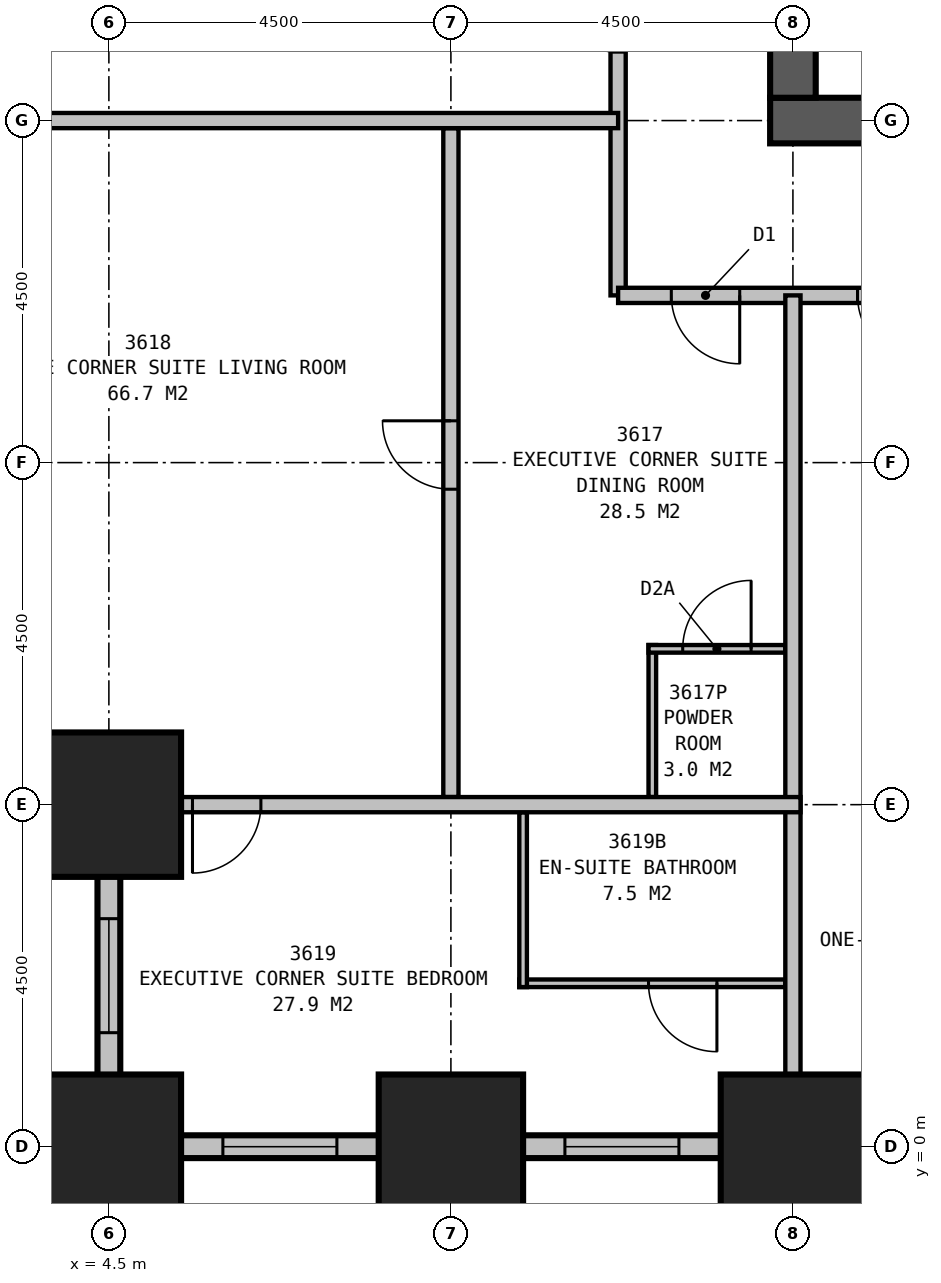
"""IFC4 building model, lengths in metres.
Left out: names, types, materials, properties, quantities, classifications, styles, units other than length and angle.
Written with IfcOpenShell. Run it as: python <this file> out.ifc"""

import sys

from ifc_helpers import new_model, si_unit, direction, frame, frame_2d, origin, origin_2d, place, context, subcontext, project, spatial, rectangle, extrude, element, fill, save


model = new_model("IFC4")
c1 = context("Model", 3, precision=1e-05, world=origin(), true_north=direction((0.0, 1.0)))
c2 = subcontext(c1, "Body", "Model", "MODEL_VIEW")
j1 = project(units=[si_unit("LENGTHUNIT", "METRE"), si_unit("PLANEANGLEUNIT", "RADIAN")], contexts=[c1])
p1 = place(None, origin())
s1 = spatial("IfcSite", under=j1, at=p1, CompositionType="ELEMENT")
p2 = place(p1, origin())
s2 = spatial("IfcBuilding", under=s1, at=p2, CompositionType="ELEMENT")
p3 = place(p2, frame((0.0, 0.0, 138.9)))
s3 = spatial("IfcBuildingStorey", under=s2, at=p3, CompositionType="ELEMENT", Elevation=138.9)
for number, where, z_axis, x_axis in (
    (1, (4.5, 4.5, 0.0), (0.0, 0.0, 1.0), (1.0, 0.0, 0.0)),
    (2, (4.5, 0.0, 0.0), (0.0, 0.0, 1.0), (1.0, 0.0, 0.0)),
    (3, (9.0, 0.0, 0.0), (0.0, 0.0, 1.0), (1.0, 0.0, 0.0)),
    (4, (13.5, 0.0, 0.0), (0.0, 0.0, 1.0), (1.0, 0.0, 0.0)),
):
    element("IfcColumn", number, at=place(p3, frame(where, z_axis=z_axis, x_axis=x_axis)), inside=s3, PredefinedType="COLUMN", context=c2, shape_type="SweptSolid", body=[
        extrude(rectangle(XDim=1.9, YDim=1.9, at=origin_2d()), origin(), (0.0, 0.0, 1.0), 3.5),
    ])
p4 = place(p3, frame((13.2, 13.5, 0.0), z_axis=(0.0, 0.0, 1.0), x_axis=(1.0, 0.0, 0.0)))
e5 = element("IfcWall", 5, at=p4, inside=s3, PredefinedType="SHEAR", context=c2, shape_type="SweptSolid", body=[
    extrude(rectangle(XDim=23.1, YDim=0.6, at=frame_2d((11.55, 0.0))), origin(), (0.0, 0.0, 1.0), 3.5),
])
p5 = place(p3, frame((13.5, 16.5, 0.0), z_axis=(0.0, 0.0, 1.0), x_axis=(0.0, -1.0, 0.0)))
e6 = element("IfcWall", 6, at=p5, inside=s3, PredefinedType="SHEAR", context=c2, shape_type="SweptSolid", body=[
    extrude(rectangle(XDim=2.7, YDim=0.6, at=frame_2d((1.35, 0.0))), origin(), (0.0, 0.0, 1.0), 3.5),
])
p6 = place(p3, frame((0.35, 4.5, 0.0), z_axis=(0.0, 0.0, 1.0), x_axis=(1.0, 0.0, 0.0)))
e7 = element("IfcWall", 7, at=p6, inside=s3, PredefinedType="STANDARD", context=c2, shape_type="SweptSolid", body=[
    extrude(rectangle(XDim=4.3, YDim=0.3, at=frame_2d((2.15, 0.0))), origin(), (0.0, 0.0, 1.0), 2.15),
])
p7 = place(p6, frame((1.4, 0.0, 0.5)))
e8 = element("IfcOpeningElement", 8, at=p7, cuts=e7, PredefinedType="OPENING", context=c2, shape_type="SweptSolid", body=[
    extrude(rectangle(XDim=1.5, YDim=1.5, at=frame_2d((0.75, 0.75))), frame((0.0, 0.16, 0.0), z_axis=(0.0, -1.0, 0.0), x_axis=(1.0, 0.0, 0.0)), (0.0, 0.0, 1.0), 0.32),
])
p8 = place(p3, frame((4.5, 4.65, 0.0), z_axis=(0.0, 0.0, 1.0), x_axis=(0.0, -1.0, 0.0)))
e9 = element("IfcWall", 9, at=p8, inside=s3, PredefinedType="STANDARD", context=c2, shape_type="SweptSolid", body=[
    extrude(rectangle(XDim=4.8, YDim=0.3, at=frame_2d((2.4, 0.0))), origin(), (0.0, 0.0, 1.0), 2.15),
])
p9 = place(p8, frame((1.65, 0.0, 0.5)))
e10 = element("IfcOpeningElement", 10, at=p9, cuts=e9, PredefinedType="OPENING", context=c2, shape_type="SweptSolid", body=[
    extrude(rectangle(XDim=1.5, YDim=1.5, at=frame_2d((0.75, 0.75))), frame((0.0, 0.16, 0.0), z_axis=(0.0, -1.0, 0.0), x_axis=(1.0, 0.0, 0.0)), (0.0, 0.0, 1.0), 0.32),
])
p10 = place(p3, frame((4.35, 0.0, 0.0), z_axis=(0.0, 0.0, 1.0), x_axis=(1.0, 0.0, 0.0)))
e11 = element("IfcWall", 11, at=p10, inside=s3, PredefinedType="STANDARD", context=c2, shape_type="SweptSolid", body=[
    extrude(rectangle(XDim=40.8, YDim=0.3, at=frame_2d((20.4, 0.0))), origin(), (0.0, 0.0, 1.0), 2.15),
])
p11 = place(p10, frame((1.65, 0.0, 0.5)))
e12 = element("IfcOpeningElement", 12, at=p11, cuts=e11, PredefinedType="OPENING", context=c2, shape_type="SweptSolid", body=[
    extrude(rectangle(XDim=1.5, YDim=1.5, at=frame_2d((0.75, 0.75))), frame((0.0, 0.16, 0.0), z_axis=(0.0, -1.0, 0.0), x_axis=(1.0, 0.0, 0.0)), (0.0, 0.0, 1.0), 0.32),
])
p12 = place(p10, frame((6.15, 0.0, 0.5)))
e13 = element("IfcOpeningElement", 13, at=p12, cuts=e11, PredefinedType="OPENING", context=c2, shape_type="SweptSolid", body=[
    extrude(rectangle(XDim=1.5, YDim=1.5, at=frame_2d((0.75, 0.75))), frame((0.0, 0.16, 0.0), z_axis=(0.0, -1.0, 0.0), x_axis=(1.0, 0.0, 0.0)), (0.0, 0.0, 1.0), 0.32),
])
p13 = place(p10, frame((10.65, 0.0, 0.5)))
e14 = element("IfcOpeningElement", 14, at=p13, cuts=e11, PredefinedType="OPENING", context=c2, shape_type="SweptSolid", body=[
    extrude(rectangle(XDim=1.5, YDim=1.5, at=frame_2d((0.75, 0.75))), frame((0.0, 0.16, 0.0), z_axis=(0.0, -1.0, 0.0), x_axis=(1.0, 0.0, 0.0)), (0.0, 0.0, 1.0), 0.32),
])
p14 = place(p10, frame((15.15, 0.0, 0.5)))
e15 = element("IfcOpeningElement", 15, at=p14, cuts=e11, PredefinedType="OPENING", context=c2, shape_type="SweptSolid", body=[
    extrude(rectangle(XDim=1.5, YDim=1.5, at=frame_2d((0.75, 0.75))), frame((0.0, 0.16, 0.0), z_axis=(0.0, -1.0, 0.0), x_axis=(1.0, 0.0, 0.0)), (0.0, 0.0, 1.0), 0.32),
])
p15 = place(p10, frame((19.65, 0.0, 0.5)))
e16 = element("IfcOpeningElement", 16, at=p15, cuts=e11, PredefinedType="OPENING", context=c2, shape_type="SweptSolid", body=[
    extrude(rectangle(XDim=1.5, YDim=1.5, at=frame_2d((0.75, 0.75))), frame((0.0, 0.16, 0.0), z_axis=(0.0, -1.0, 0.0), x_axis=(1.0, 0.0, 0.0)), (0.0, 0.0, 1.0), 0.32),
])
p16 = place(p10, frame((24.15, 0.0, 0.5)))
e17 = element("IfcOpeningElement", 17, at=p16, cuts=e11, PredefinedType="OPENING", context=c2, shape_type="SweptSolid", body=[
    extrude(rectangle(XDim=1.5, YDim=1.5, at=frame_2d((0.75, 0.75))), frame((0.0, 0.16, 0.0), z_axis=(0.0, -1.0, 0.0), x_axis=(1.0, 0.0, 0.0)), (0.0, 0.0, 1.0), 0.32),
])
p17 = place(p10, frame((28.65, 0.0, 0.5)))
e18 = element("IfcOpeningElement", 18, at=p17, cuts=e11, PredefinedType="OPENING", context=c2, shape_type="SweptSolid", body=[
    extrude(rectangle(XDim=1.5, YDim=1.5, at=frame_2d((0.75, 0.75))), frame((0.0, 0.16, 0.0), z_axis=(0.0, -1.0, 0.0), x_axis=(1.0, 0.0, 0.0)), (0.0, 0.0, 1.0), 0.32),
])
p18 = place(p10, frame((33.15, 0.0, 0.5)))
e19 = element("IfcOpeningElement", 19, at=p18, cuts=e11, PredefinedType="OPENING", context=c2, shape_type="SweptSolid", body=[
    extrude(rectangle(XDim=1.5, YDim=1.5, at=frame_2d((0.75, 0.75))), frame((0.0, 0.16, 0.0), z_axis=(0.0, -1.0, 0.0), x_axis=(1.0, 0.0, 0.0)), (0.0, 0.0, 1.0), 0.32),
])
p19 = place(p10, frame((37.65, 0.0, 0.5)))
e20 = element("IfcOpeningElement", 20, at=p19, cuts=e11, PredefinedType="OPENING", context=c2, shape_type="SweptSolid", body=[
    extrude(rectangle(XDim=1.5, YDim=1.5, at=frame_2d((0.75, 0.75))), frame((0.0, 0.16, 0.0), z_axis=(0.0, -1.0, 0.0), x_axis=(1.0, 0.0, 0.0)), (0.0, 0.0, 1.0), 0.32),
])
p20 = place(p3, frame((4.017, 36.149, 0.0), z_axis=(0.0, 0.0, 1.0), x_axis=(-0.110433201132, -0.993883548555, 0.0)))
e21 = element("IfcWall", 21, at=p20, inside=s3, PredefinedType="STANDARD", context=c2, shape_type="SweptSolid", body=[
    extrude(rectangle(XDim=31.994, YDim=0.3, at=frame_2d((15.997, 0.0))), origin(), (0.0, 0.0, 1.0), 2.15),
])
p21 = place(p20, frame((1.664, 0.0, 0.5)))
e22 = element("IfcOpeningElement", 22, at=p21, cuts=e21, PredefinedType="OPENING", context=c2, shape_type="SweptSolid", body=[
    extrude(rectangle(XDim=1.5, YDim=1.5, at=frame_2d((0.75, 0.75))), frame((0.0, 0.16, 0.0), z_axis=(0.0, -1.0, 0.0), x_axis=(1.0, 0.0, 0.0)), (0.0, 0.0, 1.0), 0.32),
])
p22 = place(p20, frame((6.192, 0.0, 0.5)))
e23 = element("IfcOpeningElement", 23, at=p22, cuts=e21, PredefinedType="OPENING", context=c2, shape_type="SweptSolid", body=[
    extrude(rectangle(XDim=1.5, YDim=1.5, at=frame_2d((0.75, 0.75))), frame((0.0, 0.16, 0.0), z_axis=(0.0, -1.0, 0.0), x_axis=(1.0, 0.0, 0.0)), (0.0, 0.0, 1.0), 0.32),
])
p23 = place(p20, frame((10.719, 0.0, 0.5)))
e24 = element("IfcOpeningElement", 24, at=p23, cuts=e21, PredefinedType="OPENING", context=c2, shape_type="SweptSolid", body=[
    extrude(rectangle(XDim=1.5, YDim=1.5, at=frame_2d((0.75, 0.75))), frame((0.0, 0.16, 0.0), z_axis=(0.0, -1.0, 0.0), x_axis=(1.0, 0.0, 0.0)), (0.0, 0.0, 1.0), 0.32),
])
p24 = place(p20, frame((15.247, 0.0, 0.5)))
e25 = element("IfcOpeningElement", 25, at=p24, cuts=e21, PredefinedType="OPENING", context=c2, shape_type="SweptSolid", body=[
    extrude(rectangle(XDim=1.5, YDim=1.5, at=frame_2d((0.75, 0.75))), frame((0.0, 0.16, 0.0), z_axis=(0.0, -1.0, 0.0), x_axis=(1.0, 0.0, 0.0)), (0.0, 0.0, 1.0), 0.32),
])
p25 = place(p20, frame((19.775, 0.0, 0.5)))
e26 = element("IfcOpeningElement", 26, at=p25, cuts=e21, PredefinedType="OPENING", context=c2, shape_type="SweptSolid", body=[
    extrude(rectangle(XDim=1.5, YDim=1.5, at=frame_2d((0.75, 0.75))), frame((0.0, 0.16, 0.0), z_axis=(0.0, -1.0, 0.0), x_axis=(1.0, 0.0, 0.0)), (0.0, 0.0, 1.0), 0.32),
])
p26 = place(p20, frame((24.302, 0.0, 0.5)))
e27 = element("IfcOpeningElement", 27, at=p26, cuts=e21, PredefinedType="OPENING", context=c2, shape_type="SweptSolid", body=[
    extrude(rectangle(XDim=1.5, YDim=1.5, at=frame_2d((0.75, 0.75))), frame((0.0, 0.16, 0.0), z_axis=(0.0, -1.0, 0.0), x_axis=(1.0, 0.0, 0.0)), (0.0, 0.0, 1.0), 0.32),
])
p27 = place(p20, frame((28.83, 0.0, 0.5)))
e28 = element("IfcOpeningElement", 28, at=p27, cuts=e21, PredefinedType="OPENING", context=c2, shape_type="SweptSolid", body=[
    extrude(rectangle(XDim=1.5, YDim=1.5, at=frame_2d((0.75, 0.75))), frame((0.0, 0.16, 0.0), z_axis=(0.0, -1.0, 0.0), x_axis=(1.0, 0.0, 0.0)), (0.0, 0.0, 1.0), 0.32),
])
p28 = place(p3, frame((11.2, 11.2, 0.0), z_axis=(0.0, 0.0, 1.0), x_axis=(1.0, 0.0, 0.0)))
e29 = element("IfcWall", 29, at=p28, inside=s3, PredefinedType="PARTITIONING", context=c2, shape_type="SweptSolid", body=[
    extrude(rectangle(XDim=27.1, YDim=0.2, at=frame_2d((13.55, 0.0))), origin(), (0.0, 0.0, 1.0), 3.25),
])
p29 = place(p28, frame((4.05, 0.0, 0.0), z_axis=(0.0, 0.0, 1.0), x_axis=(-1.0, 0.0, 0.0)))
e30 = element("IfcOpeningElement", 30, at=p29, cuts=e29, PredefinedType="OPENING", context=c2, shape_type="SweptSolid", body=[
    extrude(rectangle(XDim=0.9, YDim=2.1, at=frame_2d((0.45, 1.05))), frame((0.0, 0.11, 0.0), z_axis=(0.0, -1.0, 0.0), x_axis=(1.0, 0.0, 0.0)), (0.0, 0.0, 1.0), 0.22),
])
p30 = place(p28, frame((12.65, 0.0, 0.0), z_axis=(0.0, 0.0, 1.0), x_axis=(-1.0, 0.0, 0.0)))
e31 = element("IfcOpeningElement", 31, at=p30, cuts=e29, PredefinedType="OPENING", context=c2, shape_type="SweptSolid", body=[
    extrude(rectangle(XDim=1.0, YDim=2.1, at=frame_2d((0.5, 1.05))), frame((0.0, 0.11, 0.0), z_axis=(0.0, -1.0, 0.0), x_axis=(1.0, 0.0, 0.0)), (0.0, 0.0, 1.0), 0.22),
])
p31 = place(p28, frame((19.45, 0.0, 0.0), z_axis=(0.0, 0.0, 1.0), x_axis=(-1.0, 0.0, 0.0)))
e32 = element("IfcOpeningElement", 32, at=p31, cuts=e29, PredefinedType="OPENING", context=c2, shape_type="SweptSolid", body=[
    extrude(rectangle(XDim=0.9, YDim=2.1, at=frame_2d((0.45, 1.05))), frame((0.0, 0.11, 0.0), z_axis=(0.0, -1.0, 0.0), x_axis=(1.0, 0.0, 0.0)), (0.0, 0.0, 1.0), 0.22),
])
p32 = place(p28, frame((1.6, 0.0, 0.0), z_axis=(0.0, 0.0, 1.0), x_axis=(-1.0, 0.0, 0.0)))
e33 = element("IfcOpeningElement", 33, at=p32, cuts=e29, PredefinedType="OPENING", context=c2, shape_type="SweptSolid", body=[
    extrude(rectangle(XDim=0.9, YDim=2.1, at=frame_2d((0.45, 1.05))), frame((0.0, 0.11, 0.0), z_axis=(0.0, -1.0, 0.0), x_axis=(1.0, 0.0, 0.0)), (0.0, 0.0, 1.0), 0.22),
])
p33 = place(p28, frame((26.4, 0.0, 0.0), z_axis=(0.0, 0.0, 1.0), x_axis=(-1.0, 0.0, 0.0)))
e34 = element("IfcOpeningElement", 34, at=p33, cuts=e29, PredefinedType="OPENING", context=c2, shape_type="SweptSolid", body=[
    extrude(rectangle(XDim=0.9, YDim=2.1, at=frame_2d((0.45, 1.05))), frame((0.0, 0.11, 0.0), z_axis=(0.0, -1.0, 0.0), x_axis=(1.0, 0.0, 0.0)), (0.0, 0.0, 1.0), 0.22),
])
p34 = place(p3, frame((11.2, 11.2, 0.0), z_axis=(0.0, 0.0, 1.0), x_axis=(0.0, 1.0, 0.0)))
e35 = element("IfcWall", 35, at=p34, inside=s3, PredefinedType="PARTITIONING", context=c2, shape_type="SweptSolid", body=[
    extrude(rectangle(XDim=18.1, YDim=0.2, at=frame_2d((9.05, 0.0))), origin(), (0.0, 0.0, 1.0), 3.25),
])
p35 = place(p34, frame((3.2, 0.0, 0.0)))
e36 = element("IfcOpeningElement", 36, at=p35, cuts=e35, PredefinedType="OPENING", context=c2, shape_type="SweptSolid", body=[
    extrude(rectangle(XDim=1.0, YDim=2.1, at=frame_2d((0.5, 1.05))), frame((0.0, 0.11, 0.0), z_axis=(0.0, -1.0, 0.0), x_axis=(1.0, 0.0, 0.0)), (0.0, 0.0, 1.0), 0.22),
])
p36 = place(p34, frame((7.65, 0.0, 0.0)))
e37 = element("IfcOpeningElement", 37, at=p36, cuts=e35, PredefinedType="OPENING", context=c2, shape_type="SweptSolid", body=[
    extrude(rectangle(XDim=0.9, YDim=2.1, at=frame_2d((0.45, 1.05))), frame((0.0, 0.11, 0.0), z_axis=(0.0, -1.0, 0.0), x_axis=(1.0, 0.0, 0.0)), (0.0, 0.0, 1.0), 0.22),
])
p37 = place(p3, frame((11.2, 13.5, 0.0), z_axis=(0.0, 0.0, 1.0), x_axis=(-1.0, 0.0, 0.0)))
e38 = element("IfcWall", 38, at=p37, inside=s3, PredefinedType="PARTITIONING", context=c2, shape_type="SweptSolid", body=[
    extrude(rectangle(XDim=9.921, YDim=0.2, at=frame_2d((4.96, 0.0))), origin(), (0.0, 0.0, 1.0), 1.95),
])
p38 = place(p3, frame((13.5, 11.2, 0.0), z_axis=(0.0, 0.0, 1.0), x_axis=(0.0, -1.0, 0.0)))
e39 = element("IfcWall", 39, at=p38, inside=s3, PredefinedType="PARTITIONING", context=c2, shape_type="SweptSolid", body=[
    extrude(rectangle(XDim=11.2, YDim=0.2, at=frame_2d((5.6, 0.0))), origin(), (0.0, 0.0, 1.0), 2.25),
])
p39 = place(p3, frame((13.6, 4.5, 0.0), z_axis=(0.0, 0.0, 1.0), x_axis=(-1.0, 0.0, 0.0)))
e40 = element("IfcWall", 40, at=p39, inside=s3, PredefinedType="PARTITIONING", context=c2, shape_type="SweptSolid", body=[
    extrude(rectangle(XDim=9.1, YDim=0.2, at=frame_2d((4.55, 0.0))), origin(), (0.0, 0.0, 1.0), 3.25),
])
p40 = place(p39, frame((7.1, 0.0, 0.0)))
e41 = element("IfcOpeningElement", 41, at=p40, cuts=e40, PredefinedType="OPENING", context=c2, shape_type="SweptSolid", body=[
    extrude(rectangle(XDim=0.9, YDim=2.1, at=frame_2d((0.45, 1.05))), frame((0.0, 0.11, 0.0), z_axis=(0.0, -1.0, 0.0), x_axis=(1.0, 0.0, 0.0)), (0.0, 0.0, 1.0), 0.22),
])
p41 = place(p3, frame((9.0, 4.6, 0.0), z_axis=(0.0, 0.0, 1.0), x_axis=(0.0, 1.0, 0.0)))
e42 = element("IfcWall", 42, at=p41, inside=s3, PredefinedType="PARTITIONING", context=c2, shape_type="SweptSolid", body=[
    extrude(rectangle(XDim=8.8, YDim=0.2, at=frame_2d((4.4, 0.0))), origin(), (0.0, 0.0, 1.0), 2.25),
])
p42 = place(p41, frame((4.05, 0.0, 0.0)))
e43 = element("IfcOpeningElement", 43, at=p42, cuts=e42, PredefinedType="OPENING", context=c2, shape_type="SweptSolid", body=[
    extrude(rectangle(XDim=0.9, YDim=2.1, at=frame_2d((0.45, 1.05))), frame((0.0, 0.11, 0.0), z_axis=(0.0, -1.0, 0.0), x_axis=(1.0, 0.0, 0.0)), (0.0, 0.0, 1.0), 0.22),
])
p43 = place(p3, frame((11.65, 4.6, 0.0), z_axis=(0.0, 0.0, 1.0), x_axis=(0.0, 1.0, 0.0)))
e44 = element("IfcWall", 44, at=p43, inside=s3, PredefinedType="PLUMBINGWALL", context=c2, shape_type="SweptSolid", body=[
    extrude(rectangle(XDim=2.0, YDim=0.1, at=frame_2d((1.0, 0.0))), origin(), (0.0, 0.0, 1.0), 3.25),
])
p44 = place(p3, frame((13.4, 6.55, 0.0), z_axis=(0.0, 0.0, 1.0), x_axis=(-1.0, 0.0, 0.0)))
e45 = element("IfcWall", 45, at=p44, inside=s3, PredefinedType="PLUMBINGWALL", context=c2, shape_type="SweptSolid", body=[
    extrude(rectangle(XDim=1.8, YDim=0.1, at=frame_2d((0.9, 0.0))), origin(), (0.0, 0.0, 1.0), 3.25),
])
p45 = place(p44, frame((1.35, 0.0, 0.0), z_axis=(0.0, 0.0, 1.0), x_axis=(-1.0, 0.0, 0.0)))
e46 = element("IfcOpeningElement", 46, at=p45, cuts=e45, PredefinedType="OPENING", context=c2, shape_type="SweptSolid", body=[
    extrude(rectangle(XDim=0.9, YDim=2.1, at=frame_2d((0.45, 1.05))), frame((0.0, 0.06, 0.0), z_axis=(0.0, -1.0, 0.0), x_axis=(1.0, 0.0, 0.0)), (0.0, 0.0, 1.0), 0.12),
])
p46 = place(p3, frame((9.95, 4.4, 0.0), z_axis=(0.0, 0.0, 1.0), x_axis=(0.0, -1.0, 0.0)))
e47 = element("IfcWall", 47, at=p46, inside=s3, PredefinedType="PLUMBINGWALL", context=c2, shape_type="SweptSolid", body=[
    extrude(rectangle(XDim=2.3, YDim=0.1, at=frame_2d((1.15, 0.0))), origin(), (0.0, 0.0, 1.0), 3.25),
])
p47 = place(p3, frame((13.4, 2.15, 0.0), z_axis=(0.0, 0.0, 1.0), x_axis=(-1.0, 0.0, 0.0)))
e48 = element("IfcWall", 48, at=p47, inside=s3, PredefinedType="PLUMBINGWALL", context=c2, shape_type="SweptSolid", body=[
    extrude(rectangle(XDim=3.5, YDim=0.1, at=frame_2d((1.75, 0.0))), origin(), (0.0, 0.0, 1.0), 3.25),
])
p48 = place(p47, frame((0.9, 0.0, 0.0)))
e49 = element("IfcOpeningElement", 49, at=p48, cuts=e48, PredefinedType="OPENING", context=c2, shape_type="SweptSolid", body=[
    extrude(rectangle(XDim=0.9, YDim=2.1, at=frame_2d((0.45, 1.05))), frame((0.0, 0.06, 0.0), z_axis=(0.0, -1.0, 0.0), x_axis=(1.0, 0.0, 0.0)), (0.0, 0.0, 1.0), 0.12),
])
p49 = place(p9, origin())
e50 = element("IfcWindow", 50, at=p49, inside=s3, PartitioningType="SINGLE_PANEL", PredefinedType="WINDOW", context=c2, shape_type="SweptSolid", body=[
    extrude(rectangle(XDim=1.5, YDim=1.5, at=frame_2d((0.75, 0.75))), frame((0.0, 0.03, 0.0), z_axis=(0.0, -1.0, 0.0), x_axis=(1.0, 0.0, 0.0)), (0.0, 0.0, 1.0), 0.06),
])
fill(e10, e50)
p50 = place(p11, origin())
e51 = element("IfcWindow", 51, at=p50, inside=s3, PartitioningType="SINGLE_PANEL", PredefinedType="WINDOW", context=c2, shape_type="SweptSolid", body=[
    extrude(rectangle(XDim=1.5, YDim=1.5, at=frame_2d((0.75, 0.75))), frame((0.0, 0.03, 0.0), z_axis=(0.0, -1.0, 0.0), x_axis=(1.0, 0.0, 0.0)), (0.0, 0.0, 1.0), 0.06),
])
fill(e12, e51)
p51 = place(p12, origin())
e52 = element("IfcWindow", 52, at=p51, inside=s3, PartitioningType="SINGLE_PANEL", PredefinedType="WINDOW", context=c2, shape_type="SweptSolid", body=[
    extrude(rectangle(XDim=1.5, YDim=1.5, at=frame_2d((0.75, 0.75))), frame((0.0, 0.03, 0.0), z_axis=(0.0, -1.0, 0.0), x_axis=(1.0, 0.0, 0.0)), (0.0, 0.0, 1.0), 0.06),
])
fill(e13, e52)
p52 = place(p29, origin())
e53 = element("IfcDoor", 53, at=p52, inside=s3, OperationType="SINGLE_SWING_LEFT", PredefinedType="DOOR", context=c2, shape_type="SweptSolid", body=[
    extrude(rectangle(XDim=0.9, YDim=2.1, at=frame_2d((0.45, 1.05))), frame((0.0, 0.025, 0.0), z_axis=(0.0, -1.0, 0.0), x_axis=(1.0, 0.0, 0.0)), (0.0, 0.0, 1.0), 0.05),
])
fill(e30, e53)
p53 = place(p32, origin())
e54 = element("IfcDoor", 54, at=p53, inside=s3, OperationType="SINGLE_SWING_LEFT", PredefinedType="DOOR", context=c2, shape_type="SweptSolid", body=[
    extrude(rectangle(XDim=0.9, YDim=2.1, at=frame_2d((0.45, 1.05))), frame((0.0, 0.025, 0.0), z_axis=(0.0, -1.0, 0.0), x_axis=(1.0, 0.0, 0.0)), (0.0, 0.0, 1.0), 0.05),
])
fill(e33, e54)
p54 = place(p40, origin())
e55 = element("IfcDoor", 55, at=p54, inside=s3, OperationType="SINGLE_SWING_RIGHT", PredefinedType="DOOR", context=c2, shape_type="SweptSolid", body=[
    extrude(rectangle(XDim=0.9, YDim=2.1, at=frame_2d((0.45, 1.05))), frame((0.0, 0.025, 0.0), z_axis=(0.0, -1.0, 0.0), x_axis=(1.0, 0.0, 0.0)), (0.0, 0.0, 1.0), 0.05),
])
fill(e41, e55)
p55 = place(p42, origin())
e56 = element("IfcDoor", 56, at=p55, inside=s3, OperationType="SINGLE_SWING_RIGHT", PredefinedType="DOOR", context=c2, shape_type="SweptSolid", body=[
    extrude(rectangle(XDim=0.9, YDim=2.1, at=frame_2d((0.45, 1.05))), frame((0.0, 0.025, 0.0), z_axis=(0.0, -1.0, 0.0), x_axis=(1.0, 0.0, 0.0)), (0.0, 0.0, 1.0), 0.05),
])
fill(e43, e56)
p56 = place(p45, origin())
e57 = element("IfcDoor", 57, at=p56, inside=s3, OperationType="SINGLE_SWING_RIGHT", PredefinedType="DOOR", context=c2, shape_type="SweptSolid", body=[
    extrude(rectangle(XDim=0.9, YDim=2.1, at=frame_2d((0.45, 1.05))), frame((0.0, 0.025, 0.0), z_axis=(0.0, -1.0, 0.0), x_axis=(1.0, 0.0, 0.0)), (0.0, 0.0, 1.0), 0.05),
])
fill(e46, e57)
p57 = place(p48, origin())
e58 = element("IfcDoor", 58, at=p57, inside=s3, OperationType="SINGLE_SWING_LEFT", PredefinedType="DOOR", context=c2, shape_type="SweptSolid", body=[
    extrude(rectangle(XDim=0.9, YDim=2.1, at=frame_2d((0.45, 1.05))), frame((0.0, 0.025, 0.0), z_axis=(0.0, -1.0, 0.0), x_axis=(1.0, 0.0, 0.0)), (0.0, 0.0, 1.0), 0.05),
])
fill(e49, e58)
save(model, sys.argv[1])
